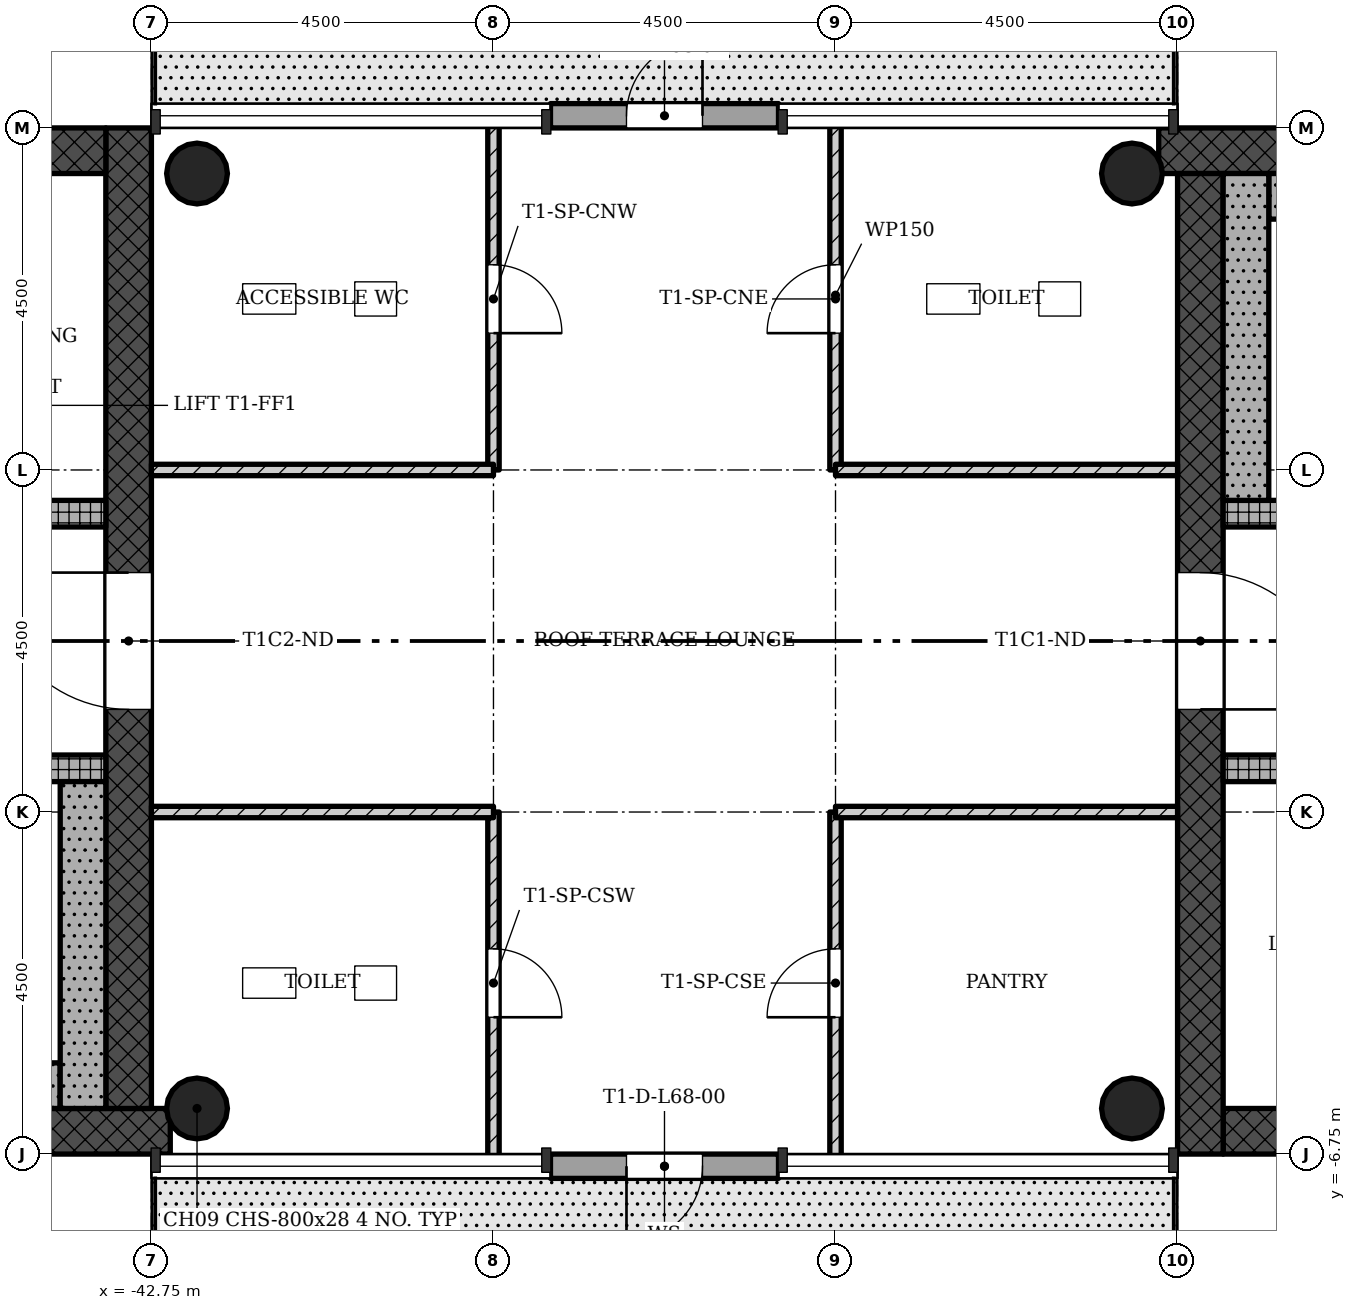
"""IFC4 building model, lengths in metres.
Left out: names, types, materials, properties, quantities, classifications, styles, units other than length and angle.
Written with IfcOpenShell. Run it as: python <this file> out.ifc"""

import sys

from ifc_helpers import new_model, si_unit, direction, frame, frame_2d, origin, origin_2d, place, context, subcontext, project, spatial, rectangle, hollow_circle, extrude, element, fill, save


model = new_model("IFC4")
c1 = context("Model", 3, precision=1e-05, world=origin(), true_north=direction((0.0, 1.0)))
c2 = subcontext(c1, "Body", "Model", "MODEL_VIEW")
j1 = project(units=[si_unit("LENGTHUNIT", "METRE"), si_unit("PLANEANGLEUNIT", "RADIAN")], contexts=[c1])
p1 = place(None, origin())
s1 = spatial("IfcSite", under=j1, at=p1, CompositionType="ELEMENT")
p2 = place(p1, origin())
s2 = spatial("IfcBuilding", under=s1, at=p2, CompositionType="ELEMENT")
p3 = place(p2, frame((0.0, 0.0, 246.9)))
s3 = spatial("IfcBuildingStorey", under=s2, at=p3, CompositionType="ELEMENT", Elevation=246.9)
p4 = place(p3, frame((-28.65, -6.45, 0.0), z_axis=(0.0, 0.0, 1.0), x_axis=(1.0, 0.0, 0.0)))
e1 = element("IfcWall", 1, at=p4, inside=s3, PredefinedType="SHEAR", context=c2, shape_type="SweptSolid", body=[
    extrude(rectangle(XDim=8.4, YDim=0.6, at=frame_2d((4.2, 0.0))), origin(), (0.0, 0.0, 1.0), 4.5),
])
p5 = place(p3, frame((-20.85, 6.45, 0.0), z_axis=(0.0, 0.0, 1.0), x_axis=(-1.0, 0.0, 0.0)))
e2 = element("IfcWall", 2, at=p5, inside=s3, PredefinedType="SHEAR", context=c2, shape_type="SweptSolid", body=[
    extrude(rectangle(XDim=8.648, YDim=0.6, at=frame_2d((4.324, 0.0))), origin(), (0.0, 0.0, 1.0), 4.5),
])
p6 = place(p3, frame((-28.95, 6.15, 0.0), z_axis=(0.0, 0.0, 1.0), x_axis=(0.0, -1.0, 0.0)))
e3 = element("IfcWall", 3, at=p6, inside=s3, PredefinedType="SHEAR", context=c2, shape_type="SweptSolid", body=[
    extrude(rectangle(XDim=12.9, YDim=0.6, at=frame_2d((6.45, 0.0))), origin(), (0.0, 0.0, 1.0), 4.5),
])
p7 = place(p6, frame((5.25, 0.0, 0.0)))
e4 = element("IfcOpeningElement", 4, at=p7, cuts=e3, PredefinedType="OPENING", context=c2, shape_type="SweptSolid", body=[
    extrude(rectangle(XDim=1.8, YDim=2.1, at=frame_2d((0.9, 1.05))), frame((0.0, 0.31, 0.0), z_axis=(0.0, -1.0, 0.0), x_axis=(1.0, 0.0, 0.0)), (0.0, 0.0, 1.0), 0.62),
])
p8 = place(p3, frame((-28.65, -1.675, 0.0), z_axis=(0.0, 0.0, 1.0), x_axis=(1.0, 0.0, 0.0)))
e5 = element("IfcWall", 5, at=p8, inside=s3, PredefinedType="SHEAR", context=c2, shape_type="SweptSolid", body=[
    extrude(rectangle(XDim=7.8, YDim=0.35, at=frame_2d((3.9, 0.0))), origin(), (0.0, 0.0, 1.0), 4.5),
])
p9 = place(p8, frame((1.15, 0.0, 0.0)))
e6 = element("IfcOpeningElement", 6, at=p9, cuts=e5, PredefinedType="OPENING", context=c2, shape_type="SweptSolid", body=[
    extrude(rectangle(XDim=1.1, YDim=2.1, at=frame_2d((0.55, 1.05))), frame((0.0, 0.185, 0.0), z_axis=(0.0, -1.0, 0.0), x_axis=(1.0, 0.0, 0.0)), (0.0, 0.0, 1.0), 0.37),
])
p10 = place(p8, frame((3.35, 0.0, 0.0)))
e7 = element("IfcOpeningElement", 7, at=p10, cuts=e5, PredefinedType="OPENING", context=c2, shape_type="SweptSolid", body=[
    extrude(rectangle(XDim=1.1, YDim=2.1, at=frame_2d((0.55, 1.05))), frame((0.0, 0.185, 0.0), z_axis=(0.0, -1.0, 0.0), x_axis=(1.0, 0.0, 0.0)), (0.0, 0.0, 1.0), 0.37),
])
p11 = place(p8, frame((5.55, 0.0, 0.0)))
e8 = element("IfcOpeningElement", 8, at=p11, cuts=e5, PredefinedType="OPENING", context=c2, shape_type="SweptSolid", body=[
    extrude(rectangle(XDim=1.1, YDim=2.1, at=frame_2d((0.55, 1.05))), frame((0.0, 0.185, 0.0), z_axis=(0.0, -1.0, 0.0), x_axis=(1.0, 0.0, 0.0)), (0.0, 0.0, 1.0), 0.37),
])
p12 = place(p3, frame((-28.65, 1.675, 0.0), z_axis=(0.0, 0.0, 1.0), x_axis=(1.0, 0.0, 0.0)))
e9 = element("IfcWall", 9, at=p12, inside=s3, PredefinedType="SHEAR", context=c2, shape_type="SweptSolid", body=[
    extrude(rectangle(XDim=7.8, YDim=0.35, at=frame_2d((3.9, 0.0))), origin(), (0.0, 0.0, 1.0), 4.5),
])
p13 = place(p12, frame((1.05, 0.0, 0.0)))
e10 = element("IfcOpeningElement", 10, at=p13, cuts=e9, PredefinedType="OPENING", context=c2, shape_type="SweptSolid", body=[
    extrude(rectangle(XDim=0.9, YDim=2.1, at=frame_2d((0.45, 1.05))), frame((0.0, 0.185, 0.0), z_axis=(0.0, -1.0, 0.0), x_axis=(1.0, 0.0, 0.0)), (0.0, 0.0, 1.0), 0.37),
])
p14 = place(p3, frame((-51.15, -6.45, 0.0), z_axis=(0.0, 0.0, 1.0), x_axis=(1.0, 0.0, 0.0)))
e11 = element("IfcWall", 11, at=p14, inside=s3, PredefinedType="SHEAR", context=c2, shape_type="SweptSolid", body=[
    extrude(rectangle(XDim=8.648, YDim=0.6, at=frame_2d((4.324, 0.0))), origin(), (0.0, 0.0, 1.0), 4.5),
])
p15 = place(p3, frame((-43.05, -6.15, 0.0), z_axis=(0.0, 0.0, 1.0), x_axis=(0.0, 1.0, 0.0)))
e12 = element("IfcWall", 12, at=p15, inside=s3, PredefinedType="SHEAR", context=c2, shape_type="SweptSolid", body=[
    extrude(rectangle(XDim=12.9, YDim=0.6, at=frame_2d((6.45, 0.0))), origin(), (0.0, 0.0, 1.0), 4.5),
])
p16 = place(p15, frame((5.25, 0.0, 0.0)))
e13 = element("IfcOpeningElement", 13, at=p16, cuts=e12, PredefinedType="OPENING", context=c2, shape_type="SweptSolid", body=[
    extrude(rectangle(XDim=1.8, YDim=2.1, at=frame_2d((0.9, 1.05))), frame((0.0, 0.31, 0.0), z_axis=(0.0, -1.0, 0.0), x_axis=(1.0, 0.0, 0.0)), (0.0, 0.0, 1.0), 0.62),
])
p17 = place(p3, frame((-43.35, 6.45, 0.0), z_axis=(0.0, 0.0, 1.0), x_axis=(-1.0, 0.0, 0.0)))
e14 = element("IfcWall", 14, at=p17, inside=s3, PredefinedType="SHEAR", context=c2, shape_type="SweptSolid", body=[
    extrude(rectangle(XDim=8.4, YDim=0.6, at=frame_2d((4.2, 0.0))), origin(), (0.0, 0.0, 1.0), 4.5),
])
p18 = place(p3, frame((-51.15, -1.675, 0.0), z_axis=(0.0, 0.0, 1.0), x_axis=(1.0, 0.0, 0.0)))
e15 = element("IfcWall", 15, at=p18, inside=s3, PredefinedType="SHEAR", context=c2, shape_type="SweptSolid", body=[
    extrude(rectangle(XDim=7.8, YDim=0.35, at=frame_2d((3.9, 0.0))), origin(), (0.0, 0.0, 1.0), 4.5),
])
p19 = place(p18, frame((5.85, 0.0, 0.0)))
e16 = element("IfcOpeningElement", 16, at=p19, cuts=e15, PredefinedType="OPENING", context=c2, shape_type="SweptSolid", body=[
    extrude(rectangle(XDim=0.9, YDim=2.1, at=frame_2d((0.45, 1.05))), frame((0.0, 0.185, 0.0), z_axis=(0.0, -1.0, 0.0), x_axis=(1.0, 0.0, 0.0)), (0.0, 0.0, 1.0), 0.37),
])
p20 = place(p3, frame((-51.15, 1.675, 0.0), z_axis=(0.0, 0.0, 1.0), x_axis=(1.0, 0.0, 0.0)))
e17 = element("IfcWall", 17, at=p20, inside=s3, PredefinedType="SHEAR", context=c2, shape_type="SweptSolid", body=[
    extrude(rectangle(XDim=7.8, YDim=0.35, at=frame_2d((3.9, 0.0))), origin(), (0.0, 0.0, 1.0), 4.5),
])
p21 = place(p20, frame((5.55, 0.0, 0.0)))
e18 = element("IfcOpeningElement", 18, at=p21, cuts=e17, PredefinedType="OPENING", context=c2, shape_type="SweptSolid", body=[
    extrude(rectangle(XDim=1.1, YDim=2.1, at=frame_2d((0.55, 1.05))), frame((0.0, 0.185, 0.0), z_axis=(0.0, -1.0, 0.0), x_axis=(1.0, 0.0, 0.0)), (0.0, 0.0, 1.0), 0.37),
])
p22 = place(p20, frame((1.2, 0.0, 0.0)))
e19 = element("IfcOpeningElement", 19, at=p22, cuts=e17, PredefinedType="OPENING", context=c2, shape_type="SweptSolid", body=[
    extrude(rectangle(XDim=1.1, YDim=2.1, at=frame_2d((0.55, 1.05))), frame((0.0, 0.185, 0.0), z_axis=(0.0, -1.0, 0.0), x_axis=(1.0, 0.0, 0.0)), (0.0, 0.0, 1.0), 0.37),
])
p23 = place(p20, frame((3.5, 0.0, 0.0)))
e20 = element("IfcOpeningElement", 20, at=p23, cuts=e17, PredefinedType="OPENING", context=c2, shape_type="SweptSolid", body=[
    extrude(rectangle(XDim=0.9, YDim=2.1, at=frame_2d((0.45, 1.05))), frame((0.0, 0.185, 0.0), z_axis=(0.0, -1.0, 0.0), x_axis=(1.0, 0.0, 0.0)), (0.0, 0.0, 1.0), 0.37),
])
for number, where, z_axis, x_axis in (
    (21, (-42.15, -6.15, 0.0), (0.0, 0.0, 1.0), (1.0, 0.0, 0.0)),
    (22, (-29.85, -6.15, 0.0), (0.0, 0.0, 1.0), (1.0, 0.0, 0.0)),
    (23, (-29.85, 6.15, 0.0), (0.0, 0.0, 1.0), (1.0, 0.0, 0.0)),
    (24, (-42.15, 6.15, 0.0), (0.0, 0.0, 1.0), (1.0, 0.0, 0.0)),
):
    element("IfcColumn", number, at=place(p3, frame(where, z_axis=z_axis, x_axis=x_axis)), inside=s3, PredefinedType="COLUMN", context=c2, shape_type="SweptSolid", body=[
        extrude(hollow_circle(Radius=0.4, WallThickness=0.028, at=origin_2d()), origin(), (0.0, 0.0, 1.0), 4.5),
    ])
p24 = place(p3, frame((-37.5, -6.91, -0.02), z_axis=(0.0, 0.0, 1.0), x_axis=(1.0, 0.0, 0.0)))
e25 = element("IfcWall", 25, at=p24, inside=s3, PredefinedType="STANDARD", context=c2, shape_type="SweptSolid", body=[
    extrude(rectangle(XDim=3.0, YDim=0.32, at=frame_2d((1.5, 0.0))), origin(), (0.0, 0.0, 1.0), 4.22),
])
p25 = place(p24, frame((1.0, 0.0, 0.02)))
e26 = element("IfcOpeningElement", 26, at=p25, cuts=e25, PredefinedType="OPENING", context=c2, shape_type="SweptSolid", body=[
    extrude(rectangle(XDim=1.0, YDim=2.1, at=frame_2d((0.5, 1.05))), frame((0.0, 0.17, 0.0), z_axis=(0.0, -1.0, 0.0), x_axis=(1.0, 0.0, 0.0)), (0.0, 0.0, 1.0), 0.34),
])
p26 = place(p3, frame((-34.5, 6.91, -0.02), z_axis=(0.0, 0.0, 1.0), x_axis=(-1.0, 0.0, 0.0)))
e27 = element("IfcWall", 27, at=p26, inside=s3, PredefinedType="STANDARD", context=c2, shape_type="SweptSolid", body=[
    extrude(rectangle(XDim=3.0, YDim=0.32, at=frame_2d((1.5, 0.0))), origin(), (0.0, 0.0, 1.0), 4.22),
])
p27 = place(p26, frame((1.0, 0.0, 0.02)))
e28 = element("IfcOpeningElement", 28, at=p27, cuts=e27, PredefinedType="OPENING", context=c2, shape_type="SweptSolid", body=[
    extrude(rectangle(XDim=1.0, YDim=2.1, at=frame_2d((0.5, 1.05))), frame((0.0, 0.17, 0.0), z_axis=(0.0, -1.0, 0.0), x_axis=(1.0, 0.0, 0.0)), (0.0, 0.0, 1.0), 0.34),
])
p28 = place(p3, frame((-33.75, 2.25, 0.0), z_axis=(0.0, 0.0, 1.0), x_axis=(0.0, 1.0, 0.0)))
e29 = element("IfcWall", 29, at=p28, inside=s3, PredefinedType="PARTITIONING", context=c2, shape_type="SweptSolid", body=[
    extrude(rectangle(XDim=4.6, YDim=0.15, at=frame_2d((2.3, 0.0))), origin(), (0.0, 0.0, 1.0), 4.1),
])
p29 = place(p28, frame((1.8, 0.0, 0.0)))
e30 = element("IfcOpeningElement", 30, at=p29, cuts=e29, PredefinedType="OPENING", context=c2, shape_type="SweptSolid", body=[
    extrude(rectangle(XDim=0.9, YDim=2.1, at=frame_2d((0.45, 1.05))), frame((0.0, 0.085, 0.0), z_axis=(0.0, -1.0, 0.0), x_axis=(1.0, 0.0, 0.0)), (0.0, 0.0, 1.0), 0.17),
])
p30 = place(p3, frame((-33.75, 2.25, 0.0), z_axis=(0.0, 0.0, 1.0), x_axis=(1.0, 0.0, 0.0)))
e31 = element("IfcWall", 31, at=p30, inside=s3, PredefinedType="PARTITIONING", context=c2, shape_type="SweptSolid", body=[
    extrude(rectangle(XDim=4.5, YDim=0.15, at=frame_2d((2.25, 0.0))), origin(), (0.0, 0.0, 1.0), 4.1),
])
p31 = place(p3, frame((-33.75, -6.85, 0.0), z_axis=(0.0, 0.0, 1.0), x_axis=(0.0, 1.0, 0.0)))
e32 = element("IfcWall", 32, at=p31, inside=s3, PredefinedType="PARTITIONING", context=c2, shape_type="SweptSolid", body=[
    extrude(rectangle(XDim=4.6, YDim=0.15, at=frame_2d((2.3, 0.0))), origin(), (0.0, 0.0, 1.0), 4.1),
])
p32 = place(p31, frame((1.9, 0.0, 0.0)))
e33 = element("IfcOpeningElement", 33, at=p32, cuts=e32, PredefinedType="OPENING", context=c2, shape_type="SweptSolid", body=[
    extrude(rectangle(XDim=0.9, YDim=2.1, at=frame_2d((0.45, 1.05))), frame((0.0, 0.085, 0.0), z_axis=(0.0, -1.0, 0.0), x_axis=(1.0, 0.0, 0.0)), (0.0, 0.0, 1.0), 0.17),
])
p33 = place(p3, frame((-33.75, -2.25, 0.0), z_axis=(0.0, 0.0, 1.0), x_axis=(1.0, 0.0, 0.0)))
e34 = element("IfcWall", 34, at=p33, inside=s3, PredefinedType="PARTITIONING", context=c2, shape_type="SweptSolid", body=[
    extrude(rectangle(XDim=4.5, YDim=0.15, at=frame_2d((2.25, 0.0))), origin(), (0.0, 0.0, 1.0), 4.1),
])
p34 = place(p3, frame((-38.25, 2.25, 0.0), z_axis=(0.0, 0.0, 1.0), x_axis=(0.0, 1.0, 0.0)))
e35 = element("IfcWall", 35, at=p34, inside=s3, PredefinedType="PARTITIONING", context=c2, shape_type="SweptSolid", body=[
    extrude(rectangle(XDim=4.6, YDim=0.15, at=frame_2d((2.3, 0.0))), origin(), (0.0, 0.0, 1.0), 4.1),
])
p35 = place(p34, frame((1.8, 0.0, 0.0)))
e36 = element("IfcOpeningElement", 36, at=p35, cuts=e35, PredefinedType="OPENING", context=c2, shape_type="SweptSolid", body=[
    extrude(rectangle(XDim=0.9, YDim=2.1, at=frame_2d((0.45, 1.05))), frame((0.0, 0.085, 0.0), z_axis=(0.0, -1.0, 0.0), x_axis=(1.0, 0.0, 0.0)), (0.0, 0.0, 1.0), 0.17),
])
p36 = place(p3, frame((-42.75, 2.25, 0.0), z_axis=(0.0, 0.0, 1.0), x_axis=(1.0, 0.0, 0.0)))
e37 = element("IfcWall", 37, at=p36, inside=s3, PredefinedType="PARTITIONING", context=c2, shape_type="SweptSolid", body=[
    extrude(rectangle(XDim=4.5, YDim=0.15, at=frame_2d((2.25, 0.0))), origin(), (0.0, 0.0, 1.0), 4.1),
])
p37 = place(p3, frame((-38.25, -6.85, 0.0), z_axis=(0.0, 0.0, 1.0), x_axis=(0.0, 1.0, 0.0)))
e38 = element("IfcWall", 38, at=p37, inside=s3, PredefinedType="PARTITIONING", context=c2, shape_type="SweptSolid", body=[
    extrude(rectangle(XDim=4.6, YDim=0.15, at=frame_2d((2.3, 0.0))), origin(), (0.0, 0.0, 1.0), 4.1),
])
p38 = place(p37, frame((1.9, 0.0, 0.0)))
e39 = element("IfcOpeningElement", 39, at=p38, cuts=e38, PredefinedType="OPENING", context=c2, shape_type="SweptSolid", body=[
    extrude(rectangle(XDim=0.9, YDim=2.1, at=frame_2d((0.45, 1.05))), frame((0.0, 0.085, 0.0), z_axis=(0.0, -1.0, 0.0), x_axis=(1.0, 0.0, 0.0)), (0.0, 0.0, 1.0), 0.17),
])
p39 = place(p3, frame((-42.75, -2.25, 0.0), z_axis=(0.0, 0.0, 1.0), x_axis=(1.0, 0.0, 0.0)))
e40 = element("IfcWall", 40, at=p39, inside=s3, PredefinedType="PARTITIONING", context=c2, shape_type="SweptSolid", body=[
    extrude(rectangle(XDim=4.5, YDim=0.15, at=frame_2d((2.25, 0.0))), origin(), (0.0, 0.0, 1.0), 4.1),
])
p40 = place(p3, frame((-28.05, 5.85, 0.0), z_axis=(0.0, 0.0, 1.0), x_axis=(1.0, 0.0, 0.0)))
e41 = element("IfcWall", 41, at=p40, inside=s3, PredefinedType="SHEAR", context=c2, shape_type="SweptSolid", body=[
    extrude(rectangle(XDim=6.6, YDim=0.6, at=frame_2d((3.3, 0.0))), origin(), (0.0, 0.0, 1.0), 4.5),
])
p41 = place(p3, frame((-28.35, 1.85, 0.0), z_axis=(0.0, 0.0, 1.0), x_axis=(0.0, 1.0, 0.0)))
e42 = element("IfcWall", 42, at=p41, inside=s3, PredefinedType="SHEAR", context=c2, shape_type="SweptSolid", body=[
    extrude(rectangle(XDim=4.3, YDim=0.6, at=frame_2d((2.15, 0.0))), origin(), (0.0, 0.0, 1.0), 4.5),
])
p42 = place(p3, frame((-43.95, -5.85, 0.0), z_axis=(0.0, 0.0, 1.0), x_axis=(-1.0, 0.0, 0.0)))
e43 = element("IfcWall", 43, at=p42, inside=s3, PredefinedType="SHEAR", context=c2, shape_type="SweptSolid", body=[
    extrude(rectangle(XDim=6.6, YDim=0.6, at=frame_2d((3.3, 0.0))), origin(), (0.0, 0.0, 1.0), 4.5),
])
p43 = place(p3, frame((-43.65, -1.85, 0.0), z_axis=(0.0, 0.0, 1.0), x_axis=(0.0, -1.0, 0.0)))
e44 = element("IfcWall", 44, at=p43, inside=s3, PredefinedType="SHEAR", context=c2, shape_type="SweptSolid", body=[
    extrude(rectangle(XDim=4.3, YDim=0.6, at=frame_2d((2.15, 0.0))), origin(), (0.0, 0.0, 1.0), 4.5),
])
p44 = place(p25, origin())
e45 = element("IfcDoor", 45, at=p44, inside=s3, OperationType="SINGLE_SWING_LEFT", PredefinedType="DOOR", context=c2, shape_type="SweptSolid", body=[
    extrude(rectangle(XDim=1.0, YDim=2.1, at=frame_2d((0.5, 1.05))), frame((0.0, 0.025, 0.0), z_axis=(0.0, -1.0, 0.0), x_axis=(1.0, 0.0, 0.0)), (0.0, 0.0, 1.0), 0.05),
])
fill(e26, e45)
p45 = place(p27, origin())
e46 = element("IfcDoor", 46, at=p45, inside=s3, OperationType="SINGLE_SWING_LEFT", PredefinedType="DOOR", context=c2, shape_type="SweptSolid", body=[
    extrude(rectangle(XDim=1.0, YDim=2.1, at=frame_2d((0.5, 1.05))), frame((0.0, 0.025, 0.0), z_axis=(0.0, -1.0, 0.0), x_axis=(1.0, 0.0, 0.0)), (0.0, 0.0, 1.0), 0.05),
])
fill(e28, e46)
p46 = place(p29, origin())
e47 = element("IfcDoor", 47, at=p46, inside=s3, OperationType="SINGLE_SWING_RIGHT", PredefinedType="DOOR", context=c2, shape_type="SweptSolid", body=[
    extrude(rectangle(XDim=0.9, YDim=2.1, at=frame_2d((0.45, 1.05))), frame((0.0, 0.025, 0.0), z_axis=(0.0, -1.0, 0.0), x_axis=(1.0, 0.0, 0.0)), (0.0, 0.0, 1.0), 0.05),
])
fill(e30, e47)
p47 = place(p32, origin())
e48 = element("IfcDoor", 48, at=p47, inside=s3, OperationType="SINGLE_SWING_RIGHT", PredefinedType="DOOR", context=c2, shape_type="SweptSolid", body=[
    extrude(rectangle(XDim=0.9, YDim=2.1, at=frame_2d((0.45, 1.05))), frame((0.0, 0.025, 0.0), z_axis=(0.0, -1.0, 0.0), x_axis=(1.0, 0.0, 0.0)), (0.0, 0.0, 1.0), 0.05),
])
fill(e33, e48)
p48 = place(p35, origin())
e49 = element("IfcDoor", 49, at=p48, inside=s3, OperationType="SINGLE_SWING_LEFT", PredefinedType="DOOR", context=c2, shape_type="SweptSolid", body=[
    extrude(rectangle(XDim=0.9, YDim=2.1, at=frame_2d((0.45, 1.05))), frame((0.0, 0.025, 0.0), z_axis=(0.0, -1.0, 0.0), x_axis=(1.0, 0.0, 0.0)), (0.0, 0.0, 1.0), 0.05),
])
fill(e36, e49)
p49 = place(p38, origin())
e50 = element("IfcDoor", 50, at=p49, inside=s3, OperationType="SINGLE_SWING_LEFT", PredefinedType="DOOR", context=c2, shape_type="SweptSolid", body=[
    extrude(rectangle(XDim=0.9, YDim=2.1, at=frame_2d((0.45, 1.05))), frame((0.0, 0.025, 0.0), z_axis=(0.0, -1.0, 0.0), x_axis=(1.0, 0.0, 0.0)), (0.0, 0.0, 1.0), 0.05),
])
fill(e39, e50)
p50 = place(p7, origin())
e51 = element("IfcDoor", 51, at=p50, inside=s3, OperationType="SINGLE_SWING_LEFT", PredefinedType="DOOR", context=c2, shape_type="SweptSolid", body=[
    extrude(rectangle(XDim=1.8, YDim=2.1, at=frame_2d((0.9, 1.05))), frame((0.0, 0.025, 0.0), z_axis=(0.0, -1.0, 0.0), x_axis=(1.0, 0.0, 0.0)), (0.0, 0.0, 1.0), 0.05),
])
fill(e4, e51)
p51 = place(p16, origin())
e52 = element("IfcDoor", 52, at=p51, inside=s3, OperationType="SINGLE_SWING_LEFT", PredefinedType="DOOR", context=c2, shape_type="SweptSolid", body=[
    extrude(rectangle(XDim=1.8, YDim=2.1, at=frame_2d((0.9, 1.05))), frame((0.0, 0.025, 0.0), z_axis=(0.0, -1.0, 0.0), x_axis=(1.0, 0.0, 0.0)), (0.0, 0.0, 1.0), 0.05),
])
fill(e13, e52)
save(model, sys.argv[1])
